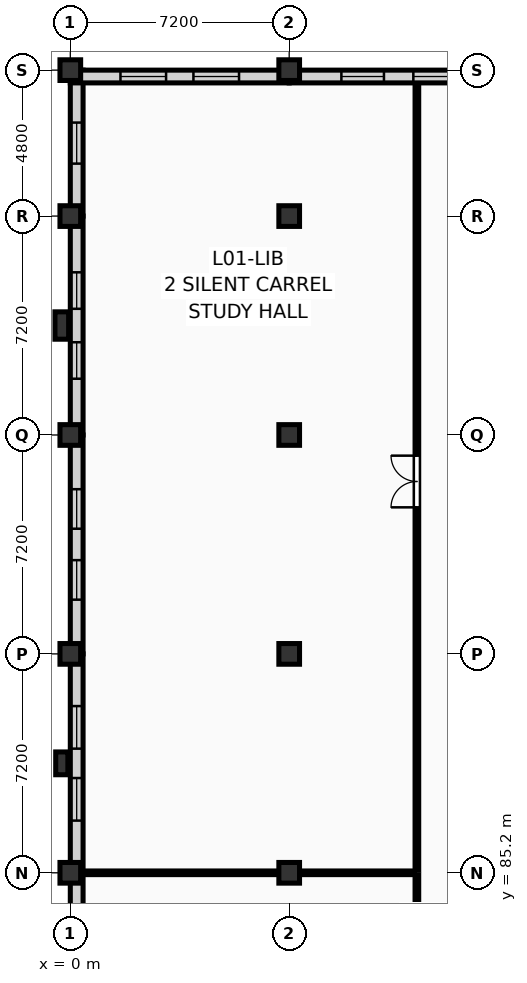
"""IFC4 building model, lengths in metres.
Left out: names, types, materials, properties, quantities, classifications, styles, units other than length and angle.
Written with IfcOpenShell. Run it as: python <this file> out.ifc"""

import sys

from ifc_helpers import new_model, si_unit, direction, frame, frame_2d, origin, origin_2d, place, context, subcontext, project, spatial, rectangle, extrude, element, fill, save


model = new_model("IFC4")
c1 = context("Model", 3, precision=1e-05, world=origin(), true_north=direction((0.0, 1.0)))
c2 = subcontext(c1, "Body", "Model", "MODEL_VIEW")
j1 = project(units=[si_unit("LENGTHUNIT", "METRE"), si_unit("PLANEANGLEUNIT", "RADIAN")], contexts=[c1])
p1 = place(None, origin())
s1 = spatial("IfcSite", under=j1, at=p1, CompositionType="ELEMENT")
p2 = place(p1, origin())
s2 = spatial("IfcBuilding", under=s1, at=p2, CompositionType="ELEMENT")
p3 = place(p2, frame((0.0, 0.0, 4.5)))
s3 = spatial("IfcBuildingStorey", under=s2, at=p3, CompositionType="ELEMENT", Elevation=4.5)
for number, where, z_axis, x_axis in (
    (1, (0.0, 85.2, 0.0), (0.0, 0.0, 1.0), (1.0, 0.0, 0.0)),
    (2, (0.0, 92.4, 0.0), (0.0, 0.0, 1.0), (1.0, 0.0, 0.0)),
    (3, (0.0, 99.6, 0.0), (0.0, 0.0, 1.0), (1.0, 0.0, 0.0)),
    (4, (0.0, 106.8, 0.0), (0.0, 0.0, 1.0), (1.0, 0.0, 0.0)),
    (5, (0.0, 111.6, 0.0), (0.0, 0.0, 1.0), (1.0, 0.0, 0.0)),
    (6, (7.2, 85.2, 0.0), (0.0, 0.0, 1.0), (1.0, 0.0, 0.0)),
    (7, (7.2, 92.4, 0.0), (0.0, 0.0, 1.0), (1.0, 0.0, 0.0)),
    (8, (7.2, 99.6, 0.0), (0.0, 0.0, 1.0), (1.0, 0.0, 0.0)),
    (9, (7.2, 106.8, 0.0), (0.0, 0.0, 1.0), (1.0, 0.0, 0.0)),
    (10, (7.2, 111.6, 0.0), (0.0, 0.0, 1.0), (1.0, 0.0, 0.0)),
):
    element("IfcColumn", number, at=place(p3, frame(where, z_axis=z_axis, x_axis=x_axis)), inside=s3, PredefinedType="COLUMN", context=c2, shape_type="SweptSolid", body=[
        extrude(rectangle(XDim=0.68, YDim=0.68, at=origin_2d()), origin(), (0.0, 0.0, 1.0), 4.05),
    ])
p4 = place(p3, frame((-0.28, 88.8, 0.0), z_axis=(0.0, 0.0, 1.0), x_axis=(1.0, 0.0, 0.0)))
e11 = element("IfcColumn", 11, at=p4, inside=s3, PredefinedType="PILASTER", context=c2, shape_type="SweptSolid", body=[
    extrude(rectangle(XDim=0.4, YDim=0.75, at=origin_2d()), origin(), (0.0, 0.0, 1.0), 4.05),
])
p5 = place(p3, frame((-0.28, 103.2, 0.0), z_axis=(0.0, 0.0, 1.0), x_axis=(1.0, 0.0, 0.0)))
e12 = element("IfcColumn", 12, at=p5, inside=s3, PredefinedType="PILASTER", context=c2, shape_type="SweptSolid", body=[
    extrude(rectangle(XDim=0.45, YDim=0.9, at=origin_2d()), origin(), (0.0, 0.0, 1.0), 4.05),
])
p6 = place(p3, frame((0.21, 78.0, 0.0), z_axis=(0.0, 0.0, 1.0), x_axis=(0.0, 1.0, 0.0)))
e13 = element("IfcWall", 13, at=p6, inside=s3, PredefinedType="SOLIDWALL", context=c2, shape_type="SweptSolid", body=[
    extrude(rectangle(XDim=7.2, YDim=0.42, at=frame_2d((3.6, 0.0))), origin(), (0.0, 0.0, 1.0), 3.16),
])
p7 = place(p6, frame((1.65, 0.0, 0.45)))
e14 = element("IfcOpeningElement", 14, at=p7, cuts=e13, PredefinedType="OPENING", context=c2, shape_type="SweptSolid", body=[
    extrude(rectangle(XDim=1.5, YDim=2.4, at=frame_2d((0.75, 1.2))), frame((0.0, 0.222, 0.0), z_axis=(0.0, -1.0, 0.0), x_axis=(1.0, 0.0, 0.0)), (0.0, 0.0, 1.0), 0.444),
])
p8 = place(p6, frame((4.05, 0.0, 0.45)))
e15 = element("IfcOpeningElement", 15, at=p8, cuts=e13, PredefinedType="OPENING", context=c2, shape_type="SweptSolid", body=[
    extrude(rectangle(XDim=1.5, YDim=2.4, at=frame_2d((0.75, 1.2))), frame((0.0, 0.222, 0.0), z_axis=(0.0, -1.0, 0.0), x_axis=(1.0, 0.0, 0.0)), (0.0, 0.0, 1.0), 0.444),
])
p9 = place(p3, frame((0.21, 85.2, 0.0), z_axis=(0.0, 0.0, 1.0), x_axis=(0.0, 1.0, 0.0)))
e16 = element("IfcWall", 16, at=p9, inside=s3, PredefinedType="SOLIDWALL", context=c2, shape_type="SweptSolid", body=[
    extrude(rectangle(XDim=7.2, YDim=0.42, at=frame_2d((3.6, 0.0))), origin(), (0.0, 0.0, 1.0), 3.16),
])
p10 = place(p9, frame((1.717, 0.0, 0.45)))
e17 = element("IfcOpeningElement", 17, at=p10, cuts=e16, PredefinedType="OPENING", context=c2, shape_type="SweptSolid", body=[
    extrude(rectangle(XDim=1.4, YDim=2.38, at=frame_2d((0.7, 1.19))), frame((0.0, 0.222, 0.0), z_axis=(0.0, -1.0, 0.0), x_axis=(1.0, 0.0, 0.0)), (0.0, 0.0, 1.0), 0.444),
])
p11 = place(p9, frame((4.083, 0.0, 0.45)))
e18 = element("IfcOpeningElement", 18, at=p11, cuts=e16, PredefinedType="OPENING", context=c2, shape_type="SweptSolid", body=[
    extrude(rectangle(XDim=1.4, YDim=2.38, at=frame_2d((0.7, 1.19))), frame((0.0, 0.222, 0.0), z_axis=(0.0, -1.0, 0.0), x_axis=(1.0, 0.0, 0.0)), (0.0, 0.0, 1.0), 0.444),
])
p12 = place(p3, frame((0.21, 92.4, 0.0), z_axis=(0.0, 0.0, 1.0), x_axis=(0.0, 1.0, 0.0)))
e19 = element("IfcWall", 19, at=p12, inside=s3, PredefinedType="SOLIDWALL", context=c2, shape_type="SweptSolid", body=[
    extrude(rectangle(XDim=7.2, YDim=0.42, at=frame_2d((3.6, 0.0))), origin(), (0.0, 0.0, 1.0), 3.16),
])
p13 = place(p12, frame((1.783, 0.0, 0.45)))
e20 = element("IfcOpeningElement", 20, at=p13, cuts=e19, PredefinedType="OPENING", context=c2, shape_type="SweptSolid", body=[
    extrude(rectangle(XDim=1.3, YDim=2.35, at=frame_2d((0.65, 1.175))), frame((0.0, 0.222, 0.0), z_axis=(0.0, -1.0, 0.0), x_axis=(1.0, 0.0, 0.0)), (0.0, 0.0, 1.0), 0.444),
])
p14 = place(p12, frame((4.117, 0.0, 0.45)))
e21 = element("IfcOpeningElement", 21, at=p14, cuts=e19, PredefinedType="OPENING", context=c2, shape_type="SweptSolid", body=[
    extrude(rectangle(XDim=1.3, YDim=2.35, at=frame_2d((0.65, 1.175))), frame((0.0, 0.222, 0.0), z_axis=(0.0, -1.0, 0.0), x_axis=(1.0, 0.0, 0.0)), (0.0, 0.0, 1.0), 0.444),
])
p15 = place(p3, frame((0.21, 99.6, 0.0), z_axis=(0.0, 0.0, 1.0), x_axis=(0.0, 1.0, 0.0)))
e22 = element("IfcWall", 22, at=p15, inside=s3, PredefinedType="SOLIDWALL", context=c2, shape_type="SweptSolid", body=[
    extrude(rectangle(XDim=7.2, YDim=0.42, at=frame_2d((3.6, 0.0))), origin(), (0.0, 0.0, 1.0), 3.16),
])
p16 = place(p15, frame((1.85, 0.0, 0.45)))
e23 = element("IfcOpeningElement", 23, at=p16, cuts=e22, PredefinedType="OPENING", context=c2, shape_type="SweptSolid", body=[
    extrude(rectangle(XDim=1.2, YDim=2.35, at=frame_2d((0.6, 1.175))), frame((0.0, 0.222, 0.0), z_axis=(0.0, -1.0, 0.0), x_axis=(1.0, 0.0, 0.0)), (0.0, 0.0, 1.0), 0.444),
])
p17 = place(p15, frame((4.15, 0.0, 0.45)))
e24 = element("IfcOpeningElement", 24, at=p17, cuts=e22, PredefinedType="OPENING", context=c2, shape_type="SweptSolid", body=[
    extrude(rectangle(XDim=1.2, YDim=2.35, at=frame_2d((0.6, 1.175))), frame((0.0, 0.222, 0.0), z_axis=(0.0, -1.0, 0.0), x_axis=(1.0, 0.0, 0.0)), (0.0, 0.0, 1.0), 0.444),
])
p18 = place(p3, frame((0.21, 106.8, 0.0), z_axis=(0.0, 0.0, 1.0), x_axis=(0.0, 1.0, 0.0)))
e25 = element("IfcWall", 25, at=p18, inside=s3, PredefinedType="SOLIDWALL", context=c2, shape_type="SweptSolid", body=[
    extrude(rectangle(XDim=4.8, YDim=0.42, at=frame_2d((2.4, 0.0))), origin(), (0.0, 0.0, 1.0), 3.16),
])
p19 = place(p18, frame((1.725, 0.0, 0.45)))
e26 = element("IfcOpeningElement", 26, at=p19, cuts=e25, PredefinedType="OPENING", context=c2, shape_type="SweptSolid", body=[
    extrude(rectangle(XDim=1.35, YDim=2.45, at=frame_2d((0.675, 1.225))), frame((0.0, 0.222, 0.0), z_axis=(0.0, -1.0, 0.0), x_axis=(1.0, 0.0, 0.0)), (0.0, 0.0, 1.0), 0.444),
])
p20 = place(p3, frame((0.0, 111.39, 0.0), z_axis=(0.0, 0.0, 1.0), x_axis=(1.0, 0.0, 0.0)))
e27 = element("IfcWall", 27, at=p20, inside=s3, PredefinedType="SOLIDWALL", context=c2, shape_type="SweptSolid", body=[
    extrude(rectangle(XDim=7.2, YDim=0.42, at=frame_2d((3.6, 0.0))), origin(), (0.0, 0.0, 1.0), 3.16),
])
p21 = place(p20, frame((1.65, 0.0, 0.45)))
e28 = element("IfcOpeningElement", 28, at=p21, cuts=e27, PredefinedType="OPENING", context=c2, shape_type="SweptSolid", body=[
    extrude(rectangle(XDim=1.5, YDim=2.4, at=frame_2d((0.75, 1.2))), frame((0.0, 0.222, 0.0), z_axis=(0.0, -1.0, 0.0), x_axis=(1.0, 0.0, 0.0)), (0.0, 0.0, 1.0), 0.444),
])
p22 = place(p20, frame((4.05, 0.0, 0.45)))
e29 = element("IfcOpeningElement", 29, at=p22, cuts=e27, PredefinedType="OPENING", context=c2, shape_type="SweptSolid", body=[
    extrude(rectangle(XDim=1.5, YDim=2.4, at=frame_2d((0.75, 1.2))), frame((0.0, 0.222, 0.0), z_axis=(0.0, -1.0, 0.0), x_axis=(1.0, 0.0, 0.0)), (0.0, 0.0, 1.0), 0.444),
])
p23 = place(p3, frame((7.2, 111.39, 0.0), z_axis=(0.0, 0.0, 1.0), x_axis=(1.0, 0.0, 0.0)))
e30 = element("IfcWall", 30, at=p23, inside=s3, PredefinedType="SOLIDWALL", context=c2, shape_type="SweptSolid", body=[
    extrude(rectangle(XDim=7.2, YDim=0.42, at=frame_2d((3.6, 0.0))), origin(), (0.0, 0.0, 1.0), 3.16),
])
p24 = place(p23, frame((1.717, 0.0, 0.45)))
e31 = element("IfcOpeningElement", 31, at=p24, cuts=e30, PredefinedType="OPENING", context=c2, shape_type="SweptSolid", body=[
    extrude(rectangle(XDim=1.4, YDim=2.38, at=frame_2d((0.7, 1.19))), frame((0.0, 0.222, 0.0), z_axis=(0.0, -1.0, 0.0), x_axis=(1.0, 0.0, 0.0)), (0.0, 0.0, 1.0), 0.444),
])
p25 = place(p23, frame((4.083, 0.0, 0.45)))
e32 = element("IfcOpeningElement", 32, at=p25, cuts=e30, PredefinedType="OPENING", context=c2, shape_type="SweptSolid", body=[
    extrude(rectangle(XDim=1.4, YDim=2.38, at=frame_2d((0.7, 1.19))), frame((0.0, 0.222, 0.0), z_axis=(0.0, -1.0, 0.0), x_axis=(1.0, 0.0, 0.0)), (0.0, 0.0, 1.0), 0.444),
])
p26 = place(p3, frame((11.4, 56.68, 0.0), z_axis=(0.0, 0.0, 1.0), x_axis=(0.0, 1.0, 0.0)))
e33 = element("IfcWall", 33, at=p26, inside=s3, PredefinedType="PARTITIONING", context=c2, shape_type="SweptSolid", body=[
    extrude(rectangle(XDim=28.44, YDim=0.12, at=frame_2d((14.22, 0.0))), origin(), (0.0, 0.0, 1.0), 3.775),
])
p27 = place(p26, frame((13.37, 0.0, 0.0)))
e34 = element("IfcOpeningElement", 34, at=p27, cuts=e33, PredefinedType="OPENING", context=c2, shape_type="SweptSolid", body=[
    extrude(rectangle(XDim=1.7, YDim=2.28, at=frame_2d((0.85, 1.14))), frame((0.0, 0.072, 0.0), z_axis=(0.0, -1.0, 0.0), x_axis=(1.0, 0.0, 0.0)), (0.0, 0.0, 1.0), 0.144),
])
p28 = place(p3, frame((0.48, 85.2, 0.0), z_axis=(0.0, 0.0, 1.0), x_axis=(1.0, 0.0, 0.0)))
e35 = element("IfcWall", 35, at=p28, inside=s3, PredefinedType="PARTITIONING", context=c2, shape_type="SweptSolid", body=[
    extrude(rectangle(XDim=10.84, YDim=0.12, at=frame_2d((5.42, 0.0))), origin(), (0.0, 0.0, 1.0), 3.025),
])
p29 = place(p3, frame((11.4, 85.28, 0.0), z_axis=(0.0, 0.0, 1.0), x_axis=(0.0, 1.0, 0.0)))
e36 = element("IfcWall", 36, at=p29, inside=s3, PredefinedType="PARTITIONING", context=c2, shape_type="SweptSolid", body=[
    extrude(rectangle(XDim=25.84, YDim=0.12, at=frame_2d((12.92, 0.0))), origin(), (0.0, 0.0, 1.0), 3.775),
])
p30 = place(p29, frame((11.94, 0.0, 0.0)))
e37 = element("IfcOpeningElement", 37, at=p30, cuts=e36, PredefinedType="OPENING", context=c2, shape_type="SweptSolid", body=[
    extrude(rectangle(XDim=1.7, YDim=2.28, at=frame_2d((0.85, 1.14))), frame((0.0, 0.072, 0.0), z_axis=(0.0, -1.0, 0.0), x_axis=(1.0, 0.0, 0.0)), (0.0, 0.0, 1.0), 0.144),
])
p31 = place(p10, origin())
e38 = element("IfcWindow", 38, at=p31, inside=s3, PartitioningType="SINGLE_PANEL", PredefinedType="WINDOW", context=c2, shape_type="SweptSolid", body=[
    extrude(rectangle(XDim=1.4, YDim=2.38, at=frame_2d((0.7, 1.19))), frame((0.0, 0.03, 0.0), z_axis=(0.0, -1.0, 0.0), x_axis=(1.0, 0.0, 0.0)), (0.0, 0.0, 1.0), 0.06),
])
fill(e17, e38)
p32 = place(p11, origin())
e39 = element("IfcWindow", 39, at=p32, inside=s3, PartitioningType="SINGLE_PANEL", PredefinedType="WINDOW", context=c2, shape_type="SweptSolid", body=[
    extrude(rectangle(XDim=1.4, YDim=2.38, at=frame_2d((0.7, 1.19))), frame((0.0, 0.03, 0.0), z_axis=(0.0, -1.0, 0.0), x_axis=(1.0, 0.0, 0.0)), (0.0, 0.0, 1.0), 0.06),
])
fill(e18, e39)
p33 = place(p13, origin())
e40 = element("IfcWindow", 40, at=p33, inside=s3, PartitioningType="SINGLE_PANEL", PredefinedType="WINDOW", context=c2, shape_type="SweptSolid", body=[
    extrude(rectangle(XDim=1.3, YDim=2.35, at=frame_2d((0.65, 1.175))), frame((0.0, 0.03, 0.0), z_axis=(0.0, -1.0, 0.0), x_axis=(1.0, 0.0, 0.0)), (0.0, 0.0, 1.0), 0.06),
])
fill(e20, e40)
p34 = place(p14, origin())
e41 = element("IfcWindow", 41, at=p34, inside=s3, PartitioningType="SINGLE_PANEL", PredefinedType="WINDOW", context=c2, shape_type="SweptSolid", body=[
    extrude(rectangle(XDim=1.3, YDim=2.35, at=frame_2d((0.65, 1.175))), frame((0.0, 0.03, 0.0), z_axis=(0.0, -1.0, 0.0), x_axis=(1.0, 0.0, 0.0)), (0.0, 0.0, 1.0), 0.06),
])
fill(e21, e41)
p35 = place(p16, origin())
e42 = element("IfcWindow", 42, at=p35, inside=s3, PartitioningType="SINGLE_PANEL", PredefinedType="WINDOW", context=c2, shape_type="SweptSolid", body=[
    extrude(rectangle(XDim=1.2, YDim=2.35, at=frame_2d((0.6, 1.175))), frame((0.0, 0.03, 0.0), z_axis=(0.0, -1.0, 0.0), x_axis=(1.0, 0.0, 0.0)), (0.0, 0.0, 1.0), 0.06),
])
fill(e23, e42)
p36 = place(p17, origin())
e43 = element("IfcWindow", 43, at=p36, inside=s3, PartitioningType="SINGLE_PANEL", PredefinedType="WINDOW", context=c2, shape_type="SweptSolid", body=[
    extrude(rectangle(XDim=1.2, YDim=2.35, at=frame_2d((0.6, 1.175))), frame((0.0, 0.03, 0.0), z_axis=(0.0, -1.0, 0.0), x_axis=(1.0, 0.0, 0.0)), (0.0, 0.0, 1.0), 0.06),
])
fill(e24, e43)
p37 = place(p19, origin())
e44 = element("IfcWindow", 44, at=p37, inside=s3, PartitioningType="SINGLE_PANEL", PredefinedType="WINDOW", context=c2, shape_type="SweptSolid", body=[
    extrude(rectangle(XDim=1.35, YDim=2.45, at=frame_2d((0.675, 1.225))), frame((0.0, 0.03, 0.0), z_axis=(0.0, -1.0, 0.0), x_axis=(1.0, 0.0, 0.0)), (0.0, 0.0, 1.0), 0.06),
])
fill(e26, e44)
p38 = place(p21, origin())
e45 = element("IfcWindow", 45, at=p38, inside=s3, PartitioningType="SINGLE_PANEL", PredefinedType="WINDOW", context=c2, shape_type="SweptSolid", body=[
    extrude(rectangle(XDim=1.5, YDim=2.4, at=frame_2d((0.75, 1.2))), frame((0.0, 0.03, 0.0), z_axis=(0.0, -1.0, 0.0), x_axis=(1.0, 0.0, 0.0)), (0.0, 0.0, 1.0), 0.06),
])
fill(e28, e45)
p39 = place(p22, origin())
e46 = element("IfcWindow", 46, at=p39, inside=s3, PartitioningType="SINGLE_PANEL", PredefinedType="WINDOW", context=c2, shape_type="SweptSolid", body=[
    extrude(rectangle(XDim=1.5, YDim=2.4, at=frame_2d((0.75, 1.2))), frame((0.0, 0.03, 0.0), z_axis=(0.0, -1.0, 0.0), x_axis=(1.0, 0.0, 0.0)), (0.0, 0.0, 1.0), 0.06),
])
fill(e29, e46)
p40 = place(p24, origin())
e47 = element("IfcWindow", 47, at=p40, inside=s3, PartitioningType="SINGLE_PANEL", PredefinedType="WINDOW", context=c2, shape_type="SweptSolid", body=[
    extrude(rectangle(XDim=1.4, YDim=2.38, at=frame_2d((0.7, 1.19))), frame((0.0, 0.03, 0.0), z_axis=(0.0, -1.0, 0.0), x_axis=(1.0, 0.0, 0.0)), (0.0, 0.0, 1.0), 0.06),
])
fill(e31, e47)
p41 = place(p25, origin())
e48 = element("IfcWindow", 48, at=p41, inside=s3, PartitioningType="SINGLE_PANEL", PredefinedType="WINDOW", context=c2, shape_type="SweptSolid", body=[
    extrude(rectangle(XDim=1.4, YDim=2.38, at=frame_2d((0.7, 1.19))), frame((0.0, 0.03, 0.0), z_axis=(0.0, -1.0, 0.0), x_axis=(1.0, 0.0, 0.0)), (0.0, 0.0, 1.0), 0.06),
])
fill(e32, e48)
p42 = place(p30, origin())
e49 = element("IfcDoor", 49, at=p42, inside=s3, OperationType="DOUBLE_DOOR_SINGLE_SWING", PredefinedType="DOOR", context=c2, shape_type="SweptSolid", body=[
    extrude(rectangle(XDim=1.7, YDim=2.28, at=frame_2d((0.85, 1.14))), frame((0.0, 0.025, 0.0), z_axis=(0.0, -1.0, 0.0), x_axis=(1.0, 0.0, 0.0)), (0.0, 0.0, 1.0), 0.05),
])
fill(e37, e49)
save(model, sys.argv[1])
